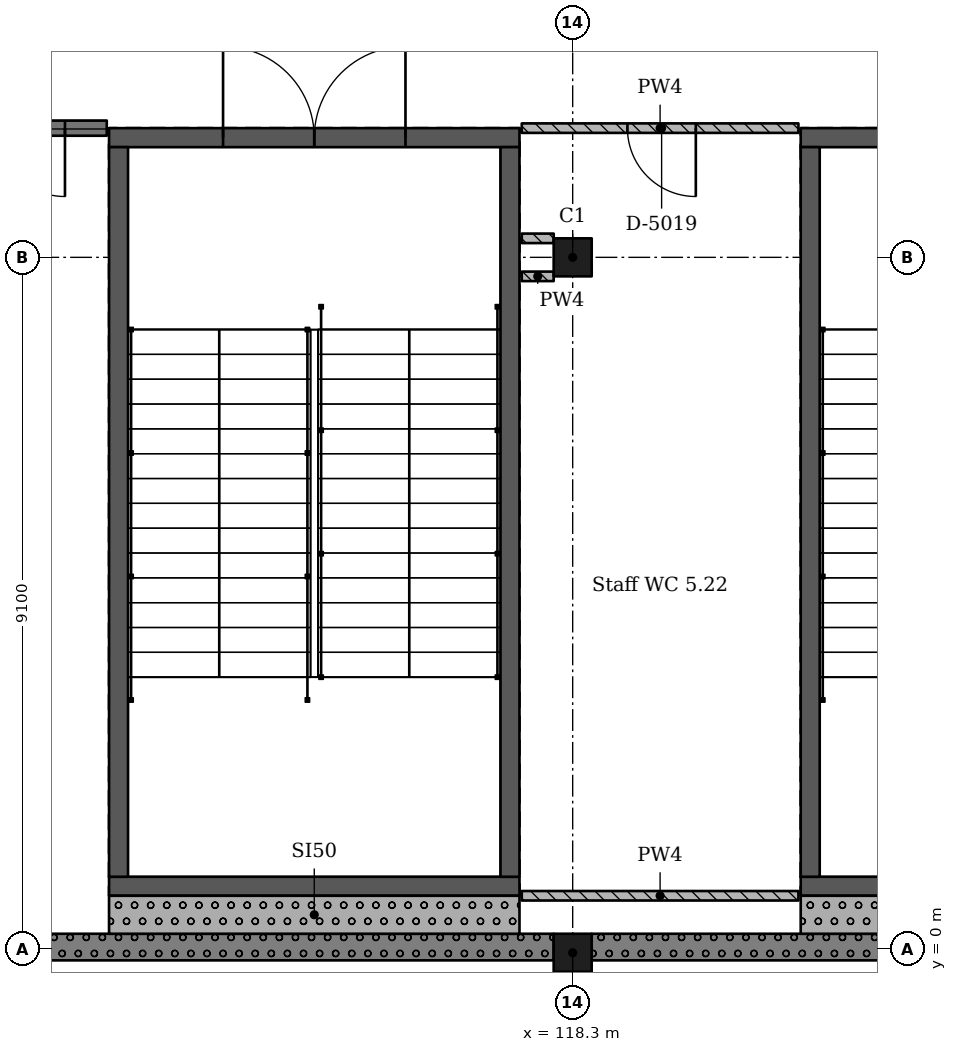
"""IFC4 building model, lengths in metres.
Left out: names, types, materials, properties, quantities, classifications, styles, units other than length and angle.
Written with IfcOpenShell. Run it as: python <this file> out.ifc"""

import sys

from ifc_helpers import new_model, si_unit, direction, frame, frame_2d, origin, origin_2d, place, context, subcontext, project, spatial, rectangle, extrude, element, fill, save


model = new_model("IFC4")
c1 = context("Model", 3, precision=1e-05, world=origin(), true_north=direction((0.0, 1.0)))
c2 = subcontext(c1, "Body", "Model", "MODEL_VIEW")
j1 = project(units=[si_unit("LENGTHUNIT", "METRE"), si_unit("PLANEANGLEUNIT", "RADIAN")], contexts=[c1])
p1 = place(None, origin())
s1 = spatial("IfcSite", under=j1, at=p1, CompositionType="ELEMENT")
p2 = place(p1, origin())
s2 = spatial("IfcBuilding", under=s1, at=p2, CompositionType="ELEMENT")
p3 = place(p2, frame((0.0, 0.0, 24.57)))
s3 = spatial("IfcBuildingStorey", under=s2, at=p3, CompositionType="ELEMENT", Elevation=24.57)
for number, where, z_axis, x_axis in (
    (1, (118.3, -0.05, 0.0), (0.0, 0.0, 1.0), (1.0, 0.0, 0.0)),
    (2, (118.3, 9.1, 0.0), (0.0, 0.0, 1.0), (1.0, 0.0, 0.0)),
):
    element("IfcColumn", number, at=place(p3, frame(where, z_axis=z_axis, x_axis=x_axis)), inside=s3, PredefinedType="COLUMN", context=c2, shape_type="SweptSolid", body=[
        extrude(rectangle(XDim=0.5, YDim=0.5, at=origin_2d()), origin(), (0.0, 0.0, 1.0), 4.55),
    ])
p4 = place(p3, frame((126.7, 0.825, 0.0), z_axis=(0.0, 0.0, 1.0), x_axis=(-1.0, 0.0, 0.0)))
e3 = element("IfcWall", 3, at=p4, inside=s3, PredefinedType="SHEAR", context=c2, shape_type="SweptSolid", body=[
    extrude(rectangle(XDim=5.4, YDim=0.25, at=frame_2d((2.7, 0.0))), origin(), (0.0, 0.0, 1.0), 4.55),
])
p5 = place(p3, frame((126.7, 10.675, 0.0), z_axis=(0.0, 0.0, 1.0), x_axis=(-1.0, 0.0, 0.0)))
e4 = element("IfcWall", 4, at=p5, inside=s3, PredefinedType="SHEAR", context=c2, shape_type="SweptSolid", body=[
    extrude(rectangle(XDim=5.4, YDim=0.25, at=frame_2d((2.7, 0.0))), origin(), (0.0, 0.0, 1.0), 4.55),
])
p6 = place(p5, frame((1.5, 0.0, 0.0)))
e5 = element("IfcOpeningElement", 5, at=p6, cuts=e4, PredefinedType="OPENING", context=c2, shape_type="SweptSolid", body=[
    extrude(rectangle(XDim=2.4, YDim=2.1, at=frame_2d((1.2, 1.05))), frame((0.0, 0.135, 0.0), z_axis=(0.0, -1.0, 0.0), x_axis=(1.0, 0.0, 0.0)), (0.0, 0.0, 1.0), 0.27),
])
p7 = place(p3, frame((121.425, 10.55, 0.0), z_axis=(0.0, 0.0, 1.0), x_axis=(0.0, -1.0, 0.0)))
e6 = element("IfcWall", 6, at=p7, inside=s3, PredefinedType="SHEAR", context=c2, shape_type="SweptSolid", body=[
    extrude(rectangle(XDim=9.6, YDim=0.25, at=frame_2d((4.8, 0.0))), origin(), (0.0, 0.0, 1.0), 4.55),
])
p8 = place(p3, frame((117.6, 0.825, 0.0), z_axis=(0.0, 0.0, 1.0), x_axis=(-1.0, 0.0, 0.0)))
e7 = element("IfcWall", 7, at=p8, inside=s3, PredefinedType="SHEAR", context=c2, shape_type="SweptSolid", body=[
    extrude(rectangle(XDim=5.4, YDim=0.25, at=frame_2d((2.7, 0.0))), origin(), (0.0, 0.0, 1.0), 4.55),
])
p9 = place(p3, frame((117.6, 10.675, 0.0), z_axis=(0.0, 0.0, 1.0), x_axis=(-1.0, 0.0, 0.0)))
e8 = element("IfcWall", 8, at=p9, inside=s3, PredefinedType="SHEAR", context=c2, shape_type="SweptSolid", body=[
    extrude(rectangle(XDim=5.4, YDim=0.25, at=frame_2d((2.7, 0.0))), origin(), (0.0, 0.0, 1.0), 4.55),
])
p10 = place(p9, frame((1.5, 0.0, 0.0)))
e9 = element("IfcOpeningElement", 9, at=p10, cuts=e8, PredefinedType="OPENING", context=c2, shape_type="SweptSolid", body=[
    extrude(rectangle(XDim=2.4, YDim=2.1, at=frame_2d((1.2, 1.05))), frame((0.0, 0.135, 0.0), z_axis=(0.0, -1.0, 0.0), x_axis=(1.0, 0.0, 0.0)), (0.0, 0.0, 1.0), 0.27),
])
for number, where, z_axis, x_axis in (
    (10, (112.325, 10.55, 0.0), (0.0, 0.0, 1.0), (0.0, -1.0, 0.0)),
    (11, (117.475, 10.55, 0.0), (0.0, 0.0, 1.0), (0.0, -1.0, 0.0)),
):
    element("IfcWall", number, at=place(p3, frame(where, z_axis=z_axis, x_axis=x_axis)), inside=s3, PredefinedType="SHEAR", context=c2, shape_type="SweptSolid", body=[
        extrude(rectangle(XDim=9.6, YDim=0.25, at=frame_2d((4.8, 0.0))), origin(), (0.0, 0.0, 1.0), 4.55),
    ])
p11 = place(p3, frame((109.45, 0.025, 0.0), z_axis=(0.0, 0.0, 1.0), x_axis=(1.0, 0.0, 0.0)))
e12 = element("IfcWall", 12, at=p11, inside=s3, PredefinedType="SOLIDWALL", context=c2, shape_type="SweptSolid", body=[
    extrude(rectangle(XDim=8.6, YDim=0.35, at=frame_2d((4.3, 0.0))), origin(), (0.0, 0.0, 1.0), 3.6),
])
p12 = place(p3, frame((118.55, 0.025, 0.0), z_axis=(0.0, 0.0, 1.0), x_axis=(1.0, 0.0, 0.0)))
e13 = element("IfcWall", 13, at=p12, inside=s3, PredefinedType="SOLIDWALL", context=c2, shape_type="SweptSolid", body=[
    extrude(rectangle(XDim=8.6, YDim=0.35, at=frame_2d((4.3, 0.0))), origin(), (0.0, 0.0, 1.0), 3.6),
])
p13 = place(p3, frame((121.3, 0.45, 0.0), z_axis=(0.0, 0.0, 1.0), x_axis=(1.0, 0.0, 0.0)))
e14 = element("IfcWall", 14, at=p13, inside=s3, PredefinedType="SOLIDWALL", context=c2, shape_type="SweptSolid", body=[
    extrude(rectangle(XDim=5.4, YDim=0.5, at=frame_2d((2.7, 0.0))), origin(), (0.0, 0.0, 1.0), 4.35),
])
p14 = place(p3, frame((112.2, 0.45, 0.0), z_axis=(0.0, 0.0, 1.0), x_axis=(1.0, 0.0, 0.0)))
e15 = element("IfcWall", 15, at=p14, inside=s3, PredefinedType="SOLIDWALL", context=c2, shape_type="SweptSolid", body=[
    extrude(rectangle(XDim=5.4, YDim=0.5, at=frame_2d((2.7, 0.0))), origin(), (0.0, 0.0, 1.0), 4.35),
])
p15 = place(p3, frame((112.17, 10.8, 0.0), z_axis=(0.0, 0.0, 1.0), x_axis=(-1.0, 0.0, 0.0)))
e16 = element("IfcWall", 16, at=p15, inside=s3, PredefinedType="PARTITIONING", context=c2, shape_type="SweptSolid", body=[
    extrude(rectangle(XDim=2.82, YDim=0.2, at=frame_2d((1.41, 0.0))), origin(), (0.0, 0.0, 1.0), 4.35),
])
p16 = place(p15, frame((0.55, 0.0, 0.0)))
e17 = element("IfcOpeningElement", 17, at=p16, cuts=e16, PredefinedType="OPENING", context=c2, shape_type="SweptSolid", body=[
    extrude(rectangle(XDim=1.8, YDim=2.4, at=frame_2d((0.9, 1.2))), frame((0.0, 0.11, 0.0), z_axis=(0.0, -1.0, 0.0), x_axis=(1.0, 0.0, 0.0)), (0.0, 0.0, 1.0), 0.22),
])
for number, where, z_axis, x_axis in (
    (18, (117.63, 8.85, 0.0), (0.0, 0.0, 1.0), (1.0, 0.0, 0.0)),
    (19, (118.05, 9.35, 0.0), (0.0, 0.0, 1.0), (-1.0, 0.0, 0.0)),
):
    element("IfcWall", number, at=place(p3, frame(where, z_axis=z_axis, x_axis=x_axis)), inside=s3, PredefinedType="PARTITIONING", context=c2, shape_type="SweptSolid", body=[
        extrude(rectangle(XDim=0.42, YDim=0.125, at=frame_2d((0.21, 0.0))), origin(), (0.0, 0.0, 1.0), 4.35),
    ])
p17 = place(p3, frame((121.27, 0.7, 0.0), z_axis=(0.0, 0.0, 1.0), x_axis=(-1.0, 0.0, 0.0)))
e20 = element("IfcWall", 20, at=p17, inside=s3, PredefinedType="PARTITIONING", context=c2, shape_type="SweptSolid", body=[
    extrude(rectangle(XDim=3.64, YDim=0.125, at=frame_2d((1.82, 0.0))), origin(), (0.0, 0.0, 1.0), 4.35),
])
p18 = place(p3, frame((121.27, 10.8, 0.0), z_axis=(0.0, 0.0, 1.0), x_axis=(-1.0, 0.0, 0.0)))
e21 = element("IfcWall", 21, at=p18, inside=s3, PredefinedType="PARTITIONING", context=c2, shape_type="SweptSolid", body=[
    extrude(rectangle(XDim=3.64, YDim=0.125, at=frame_2d((1.82, 0.0))), origin(), (0.0, 0.0, 1.0), 4.35),
])
p19 = place(p18, frame((1.35, 0.0, 0.0)))
e22 = element("IfcOpeningElement", 22, at=p19, cuts=e21, PredefinedType="OPENING", context=c2, shape_type="SweptSolid", body=[
    extrude(rectangle(XDim=0.9, YDim=2.1, at=frame_2d((0.45, 1.05))), frame((0.0, 0.073, 0.0), z_axis=(0.0, -1.0, 0.0), x_axis=(1.0, 0.0, 0.0)), (0.0, 0.0, 1.0), 0.145),
])
p20 = place(p19, origin())
e23 = element("IfcDoor", 23, at=p20, inside=s3, OperationType="SINGLE_SWING_RIGHT", PredefinedType="DOOR", context=c2, shape_type="SweptSolid", body=[
    extrude(rectangle(XDim=0.9, YDim=2.1, at=frame_2d((0.45, 1.05))), frame((0.0, 0.025, 0.0), z_axis=(0.0, -1.0, 0.0), x_axis=(1.0, 0.0, 0.0)), (0.0, 0.0, 1.0), 0.05),
])
fill(e22, e23)
p21 = place(p16, origin())
e24 = element("IfcDoor", 24, at=p21, inside=s3, OperationType="DOUBLE_DOOR_SINGLE_SWING", PredefinedType="DOOR", context=c2, shape_type="SweptSolid", body=[
    extrude(rectangle(XDim=1.8, YDim=2.4, at=frame_2d((0.9, 1.2))), frame((0.0, 0.025, 0.0), z_axis=(0.0, -1.0, 0.0), x_axis=(1.0, 0.0, 0.0)), (0.0, 0.0, 1.0), 0.05),
])
fill(e17, e24)
p22 = place(p10, origin())
e25 = element("IfcDoor", 25, at=p22, inside=s3, OperationType="DOUBLE_DOOR_SINGLE_SWING", PredefinedType="DOOR", context=c2, shape_type="SweptSolid", body=[
    extrude(rectangle(XDim=2.4, YDim=2.1, at=frame_2d((1.2, 1.05))), frame((0.0, 0.025, 0.0), z_axis=(0.0, -1.0, 0.0), x_axis=(1.0, 0.0, 0.0)), (0.0, 0.0, 1.0), 0.05),
])
fill(e9, e25)
save(model, sys.argv[1])
